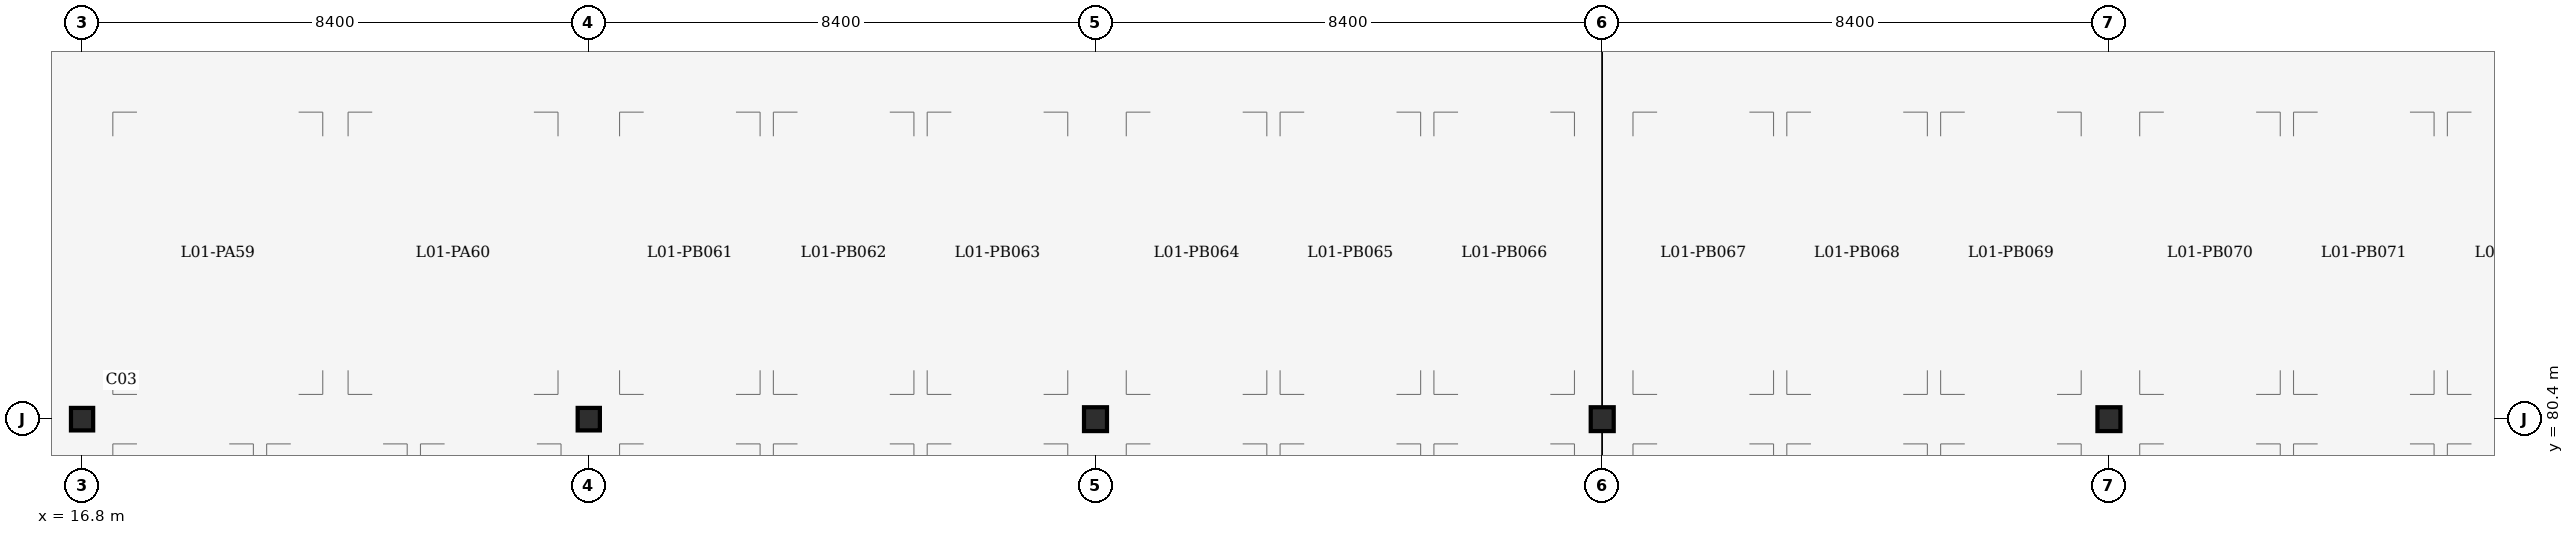
"""IFC4 building model, lengths in metres.
Left out: names, types, materials, properties, quantities, classifications, styles, units other than length and angle.
Written with IfcOpenShell. Run it as: python <this file> out.ifc"""

import sys

from ifc_helpers import new_model, si_unit, direction, frame, origin, origin_2d, place, context, subcontext, project, spatial, i_section, extrude, element, save


model = new_model("IFC4")
c1 = context("Model", 3, precision=1e-05, world=origin(), true_north=direction((0.0, 1.0)))
c2 = subcontext(c1, "Body", "Model", "MODEL_VIEW")
j1 = project(units=[si_unit("LENGTHUNIT", "METRE"), si_unit("PLANEANGLEUNIT", "RADIAN")], contexts=[c1])
p1 = place(None, origin())
s1 = spatial("IfcSite", under=j1, at=p1, CompositionType="ELEMENT")
p2 = place(p1, origin())
s2 = spatial("IfcBuilding", under=s1, at=p2, CompositionType="ELEMENT")
p3 = place(p2, frame((0.0, 0.0, 5.4)))
s3 = spatial("IfcBuildingStorey", under=s2, at=p3, CompositionType="ELEMENT", Elevation=5.4)
for number, where, z_axis, x_axis in (
    (1, (16.8, 80.4, 0.0), (0.0, 0.0, 1.0), (1.0, 0.0, 0.0)),
    (2, (25.2, 80.4, 0.0), (0.0, 0.0, 1.0), (1.0, 0.0, 0.0)),
):
    element("IfcColumn", number, at=place(p3, frame(where, z_axis=z_axis, x_axis=x_axis)), inside=s3, PredefinedType="COLUMN", context=c2, shape_type="SweptSolid", body=[
        extrude(i_section(OverallWidth=0.373, OverallDepth=0.368, WebThickness=0.014, FlangeThickness=0.024, FilletRadius=0.015, at=origin_2d()), origin(), (0.0, 0.0, 1.0), 3.6),
    ])
for number, where, z_axis, x_axis in (
    (3, (33.6, 80.4, 0.0), (0.0, 0.0, 1.0), (1.0, 0.0, 0.0)),
    (4, (42.0, 80.4, 0.0), (0.0, 0.0, 1.0), (1.0, 0.0, 0.0)),
    (5, (50.4, 80.4, 0.0), (0.0, 0.0, 1.0), (1.0, 0.0, 0.0)),
):
    element("IfcColumn", number, at=place(p3, frame(where, z_axis=z_axis, x_axis=x_axis)), inside=s3, PredefinedType="COLUMN", context=c2, shape_type="SweptSolid", body=[
        extrude(i_section(OverallWidth=0.395, OverallDepth=0.381, WebThickness=0.018, FlangeThickness=0.03, FilletRadius=0.015, at=origin_2d()), origin(), (0.0, 0.0, 1.0), 3.6),
    ])
save(model, sys.argv[1])
